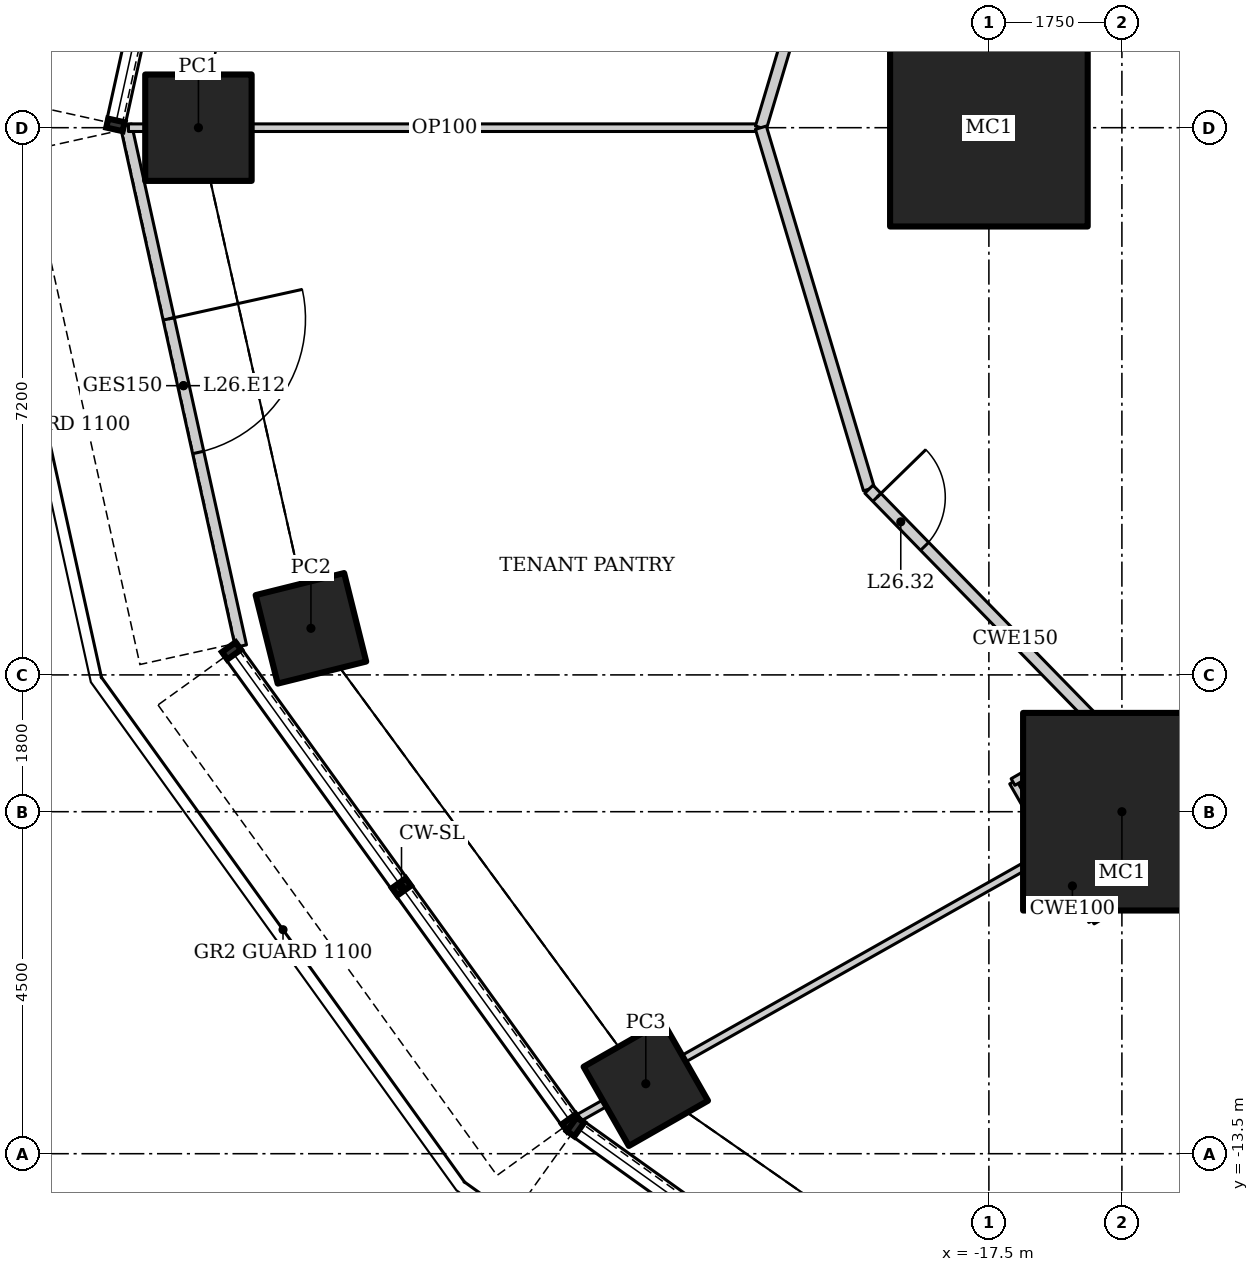
"""IFC4 building model, lengths in metres.
Left out: names, types, materials, properties, quantities, classifications, styles, units other than length and angle.
Written with IfcOpenShell. Run it as: python <this file> out.ifc"""

import sys

from ifc_helpers import new_model, si_unit, direction, frame, frame_2d, origin, origin_2d, place, context, subcontext, project, spatial, rectangle, hollow_rectangle, extrude, element, fill, save


model = new_model("IFC4")
c1 = context("Model", 3, precision=1e-05, world=origin(), true_north=direction((0.0, 1.0)))
c2 = subcontext(c1, "Body", "Model", "MODEL_VIEW")
j1 = project(units=[si_unit("LENGTHUNIT", "METRE"), si_unit("PLANEANGLEUNIT", "RADIAN")], contexts=[c1])
p1 = place(None, origin())
s1 = spatial("IfcSite", under=j1, at=p1, CompositionType="ELEMENT")
p2 = place(p1, origin())
s2 = spatial("IfcBuilding", under=s1, at=p2, CompositionType="ELEMENT")
p3 = place(p2, frame((0.0, 0.0, 111.4)))
s3 = spatial("IfcBuildingStorey", under=s2, at=p3, CompositionType="ELEMENT", Elevation=111.4)
for number, where, z_axis, x_axis in (
    (1, (-17.5, 0.0, 0.0), (0.0, 0.0, 1.0), (1.0, 0.0, 0.0)),
    (2, (-15.75, -9.0, 0.0), (0.0, 0.0, 1.0), (1.0, 0.0, 0.0)),
):
    element("IfcColumn", number, at=place(p3, frame(where, z_axis=z_axis, x_axis=x_axis)), inside=s3, PredefinedType="COLUMN", context=c2, shape_type="SweptSolid", body=[
        extrude(hollow_rectangle(XDim=2.6, YDim=2.6, WallThickness=0.13, at=origin_2d()), origin(), (0.0, 0.0, 1.0), 6.0),
    ])
p4 = place(p3, frame((-27.9, 0.0, 1.316), z_axis=(0.0, 0.0, 1.0), x_axis=(1.0, 0.0, 0.0)))
e3 = element("IfcColumn", 3, at=p4, inside=s3, PredefinedType="COLUMN", context=c2, shape_type="SweptSolid", body=[
    extrude(hollow_rectangle(XDim=1.4, YDim=1.4, WallThickness=0.1, at=origin_2d()), origin(), (0.0, 0.0, 1.0), 4.684),
])
p5 = place(p3, frame((-26.42, -6.587, 1.131), z_axis=(0.0, 0.0, 1.0), x_axis=(0.970295726276, 0.2419218956, 0.0)))
e4 = element("IfcColumn", 4, at=p5, inside=s3, PredefinedType="COLUMN", context=c2, shape_type="SweptSolid", body=[
    extrude(hollow_rectangle(XDim=1.2, YDim=1.2, WallThickness=0.1, at=origin_2d()), origin(), (0.0, 0.0, 1.0), 4.869),
])
p6 = place(p3, frame((-22.014, -12.579, 1.142), z_axis=(0.0, 0.0, 1.0), x_axis=(0.86824298017, 0.496139221777, 0.0)))
e5 = element("IfcColumn", 5, at=p6, inside=s3, PredefinedType="COLUMN", context=c2, shape_type="SweptSolid", body=[
    extrude(hollow_rectangle(XDim=1.2, YDim=1.2, WallThickness=0.12, at=origin_2d()), origin(), (0.0, 0.0, 1.0), 4.858),
])
p7 = place(p3, frame((-28.854, 0.032, 0.0), z_axis=(0.0, 0.0, 1.0), x_axis=(0.21553795351, -0.976495463685, 0.0)))
e6 = element("IfcWall", 6, at=p7, inside=s3, PredefinedType="ELEMENTEDWALL", context=c2, shape_type="SweptSolid", body=[
    extrude(rectangle(XDim=7.018, YDim=0.15, at=frame_2d((3.509, 0.0))), origin(), (0.0, 0.0, 1.0), 5.85),
])
p8 = place(p7, frame((2.609, 0.0, 0.0)))
e7 = element("IfcOpeningElement", 7, at=p8, cuts=e6, PredefinedType="OPENING", context=c2, shape_type="SweptSolid", body=[
    extrude(rectangle(XDim=1.8, YDim=2.4, at=frame_2d((0.9, 1.2))), frame((0.0, 0.085, 0.0), z_axis=(0.0, -1.0, 0.0), x_axis=(1.0, 0.0, 0.0)), (0.0, 0.0, 1.0), 0.17),
])
p9 = place(p3, frame((-28.821, 0.0, 0.0), z_axis=(0.0, 0.0, 1.0), x_axis=(1.0, 0.0, 0.0)))
e8 = element("IfcWall", 8, at=p9, inside=s3, PredefinedType="PARTITIONING", context=c2, shape_type="SweptSolid", body=[
    extrude(rectangle(XDim=8.321, YDim=0.1, at=frame_2d((4.16, 0.0))), origin(), (0.0, 0.0, 1.0), 4.65),
])
p10 = place(p3, frame((-22.949, -13.059, 0.0), z_axis=(0.0, 0.0, 1.0), x_axis=(0.870889908693, 0.491478144923, 0.0)))
e9 = element("IfcWall", 9, at=p10, inside=s3, PredefinedType="PARTITIONING", context=c2, shape_type="SweptSolid", body=[
    extrude(rectangle(XDim=8.865, YDim=0.1, at=frame_2d((4.432, 0.0))), origin(), (0.0, 0.0, 1.0), 4.65),
])
p11 = place(p3, frame((-19.078, 4.757, 0.0), z_axis=(0.0, 0.0, 1.0), x_axis=(-0.286346182056, -0.958126225516, 0.0)))
e10 = element("IfcWall", 10, at=p11, inside=s3, PredefinedType="PARTITIONING", context=c2, shape_type="SweptSolid", body=[
    extrude(rectangle(XDim=4.965, YDim=0.15, at=frame_2d((2.482, 0.0))), origin(), (0.0, 0.0, 1.0), 5.85),
])
p12 = place(p11, frame((0.15, 0.0, 0.0)))
e11 = element("IfcOpeningElement", 11, at=p12, cuts=e10, PredefinedType="OPENING", context=c2, shape_type="SweptSolid", body=[
    extrude(rectangle(XDim=0.9, YDim=2.1, at=frame_2d((0.45, 1.05))), frame((0.0, 0.085, 0.0), z_axis=(0.0, -1.0, 0.0), x_axis=(1.0, 0.0, 0.0)), (0.0, 0.0, 1.0), 0.17),
])
p13 = place(p3, frame((-20.5, 0.0, 0.0), z_axis=(0.0, 0.0, 1.0), x_axis=(0.286346182056, -0.958126225516, 0.0)))
e12 = element("IfcWall", 12, at=p13, inside=s3, PredefinedType="PARTITIONING", context=c2, shape_type="SweptSolid", body=[
    extrude(rectangle(XDim=4.965, YDim=0.15, at=frame_2d((2.482, 0.0))), origin(), (0.0, 0.0, 1.0), 5.85),
])
p14 = place(p3, frame((-19.078, -4.757, 0.0), z_axis=(0.0, 0.0, 1.0), x_axis=(0.698305033542, -0.715800307439, 0.0)))
e13 = element("IfcWall", 13, at=p14, inside=s3, PredefinedType="PARTITIONING", context=c2, shape_type="SweptSolid", body=[
    extrude(rectangle(XDim=5.512, YDim=0.15, at=frame_2d((2.756, 0.0))), origin(), (0.0, 0.0, 1.0), 5.85),
])
p15 = place(p14, frame((0.15, 0.0, 0.0)))
e14 = element("IfcOpeningElement", 14, at=p15, cuts=e13, PredefinedType="OPENING", context=c2, shape_type="SweptSolid", body=[
    extrude(rectangle(XDim=0.9, YDim=2.1, at=frame_2d((0.45, 1.05))), frame((0.0, 0.085, 0.0), z_axis=(0.0, -1.0, 0.0), x_axis=(1.0, 0.0, 0.0)), (0.0, 0.0, 1.0), 0.17),
])
p16 = place(p3, frame((-15.229, -8.702, 0.0), z_axis=(0.0, 0.0, 1.0), x_axis=(0.884643590306, -0.466267860924, 0.0)))
e15 = element("IfcWall", 15, at=p16, inside=s3, PredefinedType="PARTITIONING", context=c2, shape_type="SweptSolid", body=[
    extrude(rectangle(XDim=5.113, YDim=0.15, at=frame_2d((2.557, 0.0))), origin(), (0.0, 0.0, 1.0), 5.85),
])
p17 = place(p3, frame((-16.141, -10.433, 0.0), z_axis=(0.0, 0.0, 1.0), x_axis=(-0.496189017888, 0.868214523334, 0.0)))
e16 = element("IfcWall", 16, at=p17, inside=s3, PredefinedType="PARTITIONING", context=c2, shape_type="SweptSolid", body=[
    extrude(rectangle(XDim=1.05, YDim=0.1, at=frame_2d((0.525, 0.0))), origin(), (0.0, 0.0, 1.0), 5.85),
])
p18 = place(p3, frame((-16.666, -9.513, 0.0), z_axis=(0.0, 0.0, 1.0), x_axis=(-0.49623995811, 0.868185408755, 0.0)))
e17 = element("IfcWall", 17, at=p18, inside=s3, PredefinedType="PARTITIONING", context=c2, shape_type="SweptSolid", body=[
    extrude(rectangle(XDim=1.041, YDim=0.1, at=frame_2d((0.521, 0.0))), origin(), (0.0, 0.0, 1.0), 5.85),
])
p19 = place(p3, frame((-17.183, -8.609, 0.0), z_axis=(0.0, 0.0, 1.0), x_axis=(0.868214523334, 0.496189017888, 0.0)))
e18 = element("IfcWall", 18, at=p19, inside=s3, PredefinedType="PARTITIONING", context=c2, shape_type="SweptSolid", body=[
    extrude(rectangle(XDim=1.05, YDim=0.1, at=frame_2d((0.525, 0.0))), origin(), (0.0, 0.0, 1.0), 5.85),
])
p20 = place(p3, frame((-16.271, -8.088, 0.0), z_axis=(0.0, 0.0, 1.0), x_axis=(0.868289043195, 0.496058602856, 0.0)))
e19 = element("IfcWall", 19, at=p20, inside=s3, PredefinedType="PARTITIONING", context=c2, shape_type="SweptSolid", body=[
    extrude(rectangle(XDim=0.327, YDim=0.1, at=frame_2d((0.164, 0.0))), origin(), (0.0, 0.0, 1.0), 5.85),
])
p21 = place(p3, frame((-14.128, -9.283, 0.0), z_axis=(0.0, 0.0, 1.0), x_axis=(-0.868290539594, -0.496055983587, 0.0)))
e20 = element("IfcWall", 20, at=p21, inside=s3, PredefinedType="PARTITIONING", context=c2, shape_type="SweptSolid", body=[
    extrude(rectangle(XDim=1.268, YDim=0.1, at=frame_2d((0.634, 0.0))), origin(), (0.0, 0.0, 1.0), 5.85),
])
p22 = place(p3, frame((-15.229, -9.912, 0.0), z_axis=(0.0, 0.0, 1.0), x_axis=(-0.868214523334, -0.496189017888, 0.0)))
e21 = element("IfcWall", 21, at=p22, inside=s3, PredefinedType="PARTITIONING", context=c2, shape_type="SweptSolid", body=[
    extrude(rectangle(XDim=1.05, YDim=0.1, at=frame_2d((0.525, 0.0))), origin(), (0.0, 0.0, 1.0), 5.85),
])
p23 = place(p8, origin())
e22 = element("IfcDoor", 22, at=p23, inside=s3, OperationType="DOUBLE_DOOR_DOUBLE_SWING", PredefinedType="DOOR", context=c2, shape_type="SweptSolid", body=[
    extrude(rectangle(XDim=1.8, YDim=2.4, at=frame_2d((0.9, 1.2))), frame((0.0, 0.025, 0.0), z_axis=(0.0, -1.0, 0.0), x_axis=(1.0, 0.0, 0.0)), (0.0, 0.0, 1.0), 0.05),
])
fill(e7, e22)
p24 = place(p15, origin())
e23 = element("IfcDoor", 23, at=p24, inside=s3, OperationType="SINGLE_SWING_LEFT", PredefinedType="DOOR", context=c2, shape_type="SweptSolid", body=[
    extrude(rectangle(XDim=0.9, YDim=2.1, at=frame_2d((0.45, 1.05))), frame((0.0, 0.025, 0.0), z_axis=(0.0, -1.0, 0.0), x_axis=(1.0, 0.0, 0.0)), (0.0, 0.0, 1.0), 0.05),
])
fill(e14, e23)
save(model, sys.argv[1])
